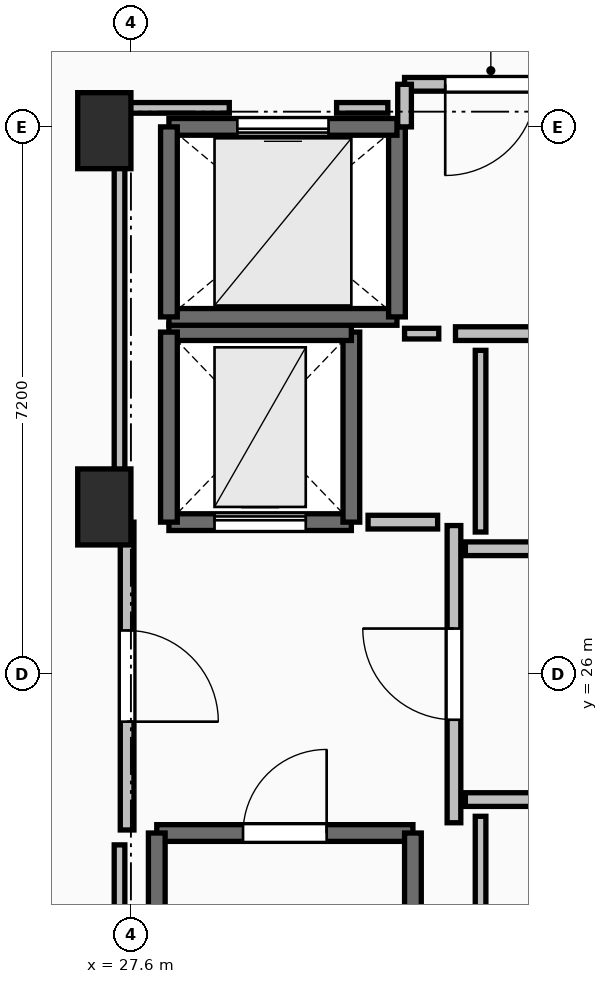
"""IFC4 building model, lengths in metres.
Left out: names, types, materials, properties, quantities, classifications, styles, units other than length and angle.
Written with IfcOpenShell. Run it as: python <this file> out.ifc"""

import sys

from ifc_helpers import new_model, si_unit, direction, frame, frame_2d, origin, origin_2d, place, context, subcontext, project, spatial, rectangle, extrude, element, fill, save


model = new_model("IFC4")
c1 = context("Model", 3, precision=1e-05, world=origin(), true_north=direction((0.0, 1.0)))
c2 = subcontext(c1, "Body", "Model", "MODEL_VIEW")
j1 = project(units=[si_unit("LENGTHUNIT", "METRE"), si_unit("PLANEANGLEUNIT", "RADIAN")], contexts=[c1])
p1 = place(None, origin())
s1 = spatial("IfcSite", under=j1, at=p1, CompositionType="ELEMENT")
p2 = place(p1, origin())
s2 = spatial("IfcBuilding", under=s1, at=p2, CompositionType="ELEMENT")
p3 = place(p2, frame((0.0, 0.0, 229.75)))
s3 = spatial("IfcBuildingStorey", under=s2, at=p3, CompositionType="ELEMENT", Elevation=229.75)
for number, where, z_axis, x_axis in (
    (1, (27.25, 28.2, 0.0), (0.0, 0.0, 1.0), (1.0, 0.0, 0.0)),
    (2, (27.25, 33.15, 0.0), (0.0, 0.0, 1.0), (1.0, 0.0, 0.0)),
):
    element("IfcColumn", number, at=place(p3, frame(where, z_axis=z_axis, x_axis=x_axis)), inside=s3, PredefinedType="PILASTER", context=c2, shape_type="SweptSolid", body=[
        extrude(rectangle(XDim=0.7, YDim=1.0, at=origin_2d()), origin(), (0.0, 0.0, 1.0), 4.5),
    ])
p4 = place(p3, frame((27.94, 23.91, 0.0), z_axis=(0.0, 0.0, 1.0), x_axis=(1.0, 0.0, 0.0)))
e3 = element("IfcWall", 3, at=p4, inside=s3, PredefinedType="SOLIDWALL", context=c2, shape_type="SweptSolid", body=[
    extrude(rectangle(XDim=3.37, YDim=0.22, at=frame_2d((1.685, 0.0))), origin(), (0.0, 0.0, 1.0), 4.24),
])
p5 = place(p4, frame((1.135, 0.0, 0.0)))
e4 = element("IfcOpeningElement", 4, at=p5, cuts=e3, PredefinedType="OPENING", context=c2, shape_type="SweptSolid", body=[
    extrude(rectangle(XDim=1.1, YDim=2.15, at=frame_2d((0.55, 1.075))), frame((0.0, 0.125, 0.0), z_axis=(0.0, -1.0, 0.0), x_axis=(1.0, 0.0, 0.0)), (0.0, 0.0, 1.0), 0.25),
])
for number, where, z_axis, x_axis in (
    (5, (31.31, 23.91, 0.0), (0.0, 0.0, 1.0), (0.0, -1.0, 0.0)),
    (6, (27.94, 16.49, 0.0), (0.0, 0.0, 1.0), (0.0, 1.0, 0.0)),
):
    element("IfcWall", number, at=place(p3, frame(where, z_axis=z_axis, x_axis=x_axis)), inside=s3, PredefinedType="SOLIDWALL", context=c2, shape_type="SweptSolid", body=[
        extrude(rectangle(XDim=7.42, YDim=0.22, at=frame_2d((3.71, 0.0))), origin(), (0.0, 0.0, 1.0), 4.24),
    ])
p6 = place(p3, frame((28.1, 28.0, 0.0), z_axis=(0.0, 0.0, 1.0), x_axis=(1.0, 0.0, 0.0)))
e7 = element("IfcWall", 7, at=p6, inside=s3, PredefinedType="SHEAR", context=c2, shape_type="SweptSolid", body=[
    extrude(rectangle(XDim=2.4, YDim=0.22, at=frame_2d((1.2, 0.0))), origin(), (0.0, 0.0, 1.0), 4.24),
])
p7 = place(p6, frame((0.6, 0.0, 0.0)))
e8 = element("IfcOpeningElement", 8, at=p7, cuts=e7, PredefinedType="OPENING", context=c2, shape_type="SweptSolid", body=[
    extrude(rectangle(XDim=1.2, YDim=2.2, at=frame_2d((0.6, 1.1))), frame((0.0, 0.125, 0.0), z_axis=(0.0, -1.0, 0.0), x_axis=(1.0, 0.0, 0.0)), (0.0, 0.0, 1.0), 0.25),
])
p8 = place(p3, frame((30.5, 28.0, 0.0), z_axis=(0.0, 0.0, 1.0), x_axis=(0.0, 1.0, 0.0)))
e9 = element("IfcWall", 9, at=p8, inside=s3, PredefinedType="SHEAR", context=c2, shape_type="SweptSolid", body=[
    extrude(rectangle(XDim=2.5, YDim=0.22, at=frame_2d((1.25, 0.0))), origin(), (0.0, 0.0, 1.0), 4.24),
])
p9 = place(p3, frame((30.5, 30.5, 0.0), z_axis=(0.0, 0.0, 1.0), x_axis=(-1.0, 0.0, 0.0)))
e10 = element("IfcWall", 10, at=p9, inside=s3, PredefinedType="SHEAR", context=c2, shape_type="SweptSolid", body=[
    extrude(rectangle(XDim=2.4, YDim=0.22, at=frame_2d((1.2, 0.0))), origin(), (0.0, 0.0, 1.0), 4.24),
])
p10 = place(p3, frame((28.1, 30.5, 0.0), z_axis=(0.0, 0.0, 1.0), x_axis=(0.0, -1.0, 0.0)))
e11 = element("IfcWall", 11, at=p10, inside=s3, PredefinedType="SHEAR", context=c2, shape_type="SweptSolid", body=[
    extrude(rectangle(XDim=2.5, YDim=0.22, at=frame_2d((1.25, 0.0))), origin(), (0.0, 0.0, 1.0), 4.24),
])
p11 = place(p3, frame((28.1, 30.7, 0.0), z_axis=(0.0, 0.0, 1.0), x_axis=(1.0, 0.0, 0.0)))
e12 = element("IfcWall", 12, at=p11, inside=s3, PredefinedType="SOLIDWALL", context=c2, shape_type="SweptSolid", body=[
    extrude(rectangle(XDim=3.0, YDim=0.22, at=frame_2d((1.5, 0.0))), origin(), (0.0, 0.0, 1.0), 4.24),
])
p12 = place(p3, frame((31.1, 30.7, 0.0), z_axis=(0.0, 0.0, 1.0), x_axis=(0.0, 1.0, 0.0)))
e13 = element("IfcWall", 13, at=p12, inside=s3, PredefinedType="SOLIDWALL", context=c2, shape_type="SweptSolid", body=[
    extrude(rectangle(XDim=2.5, YDim=0.22, at=frame_2d((1.25, 0.0))), origin(), (0.0, 0.0, 1.0), 4.24),
])
p13 = place(p3, frame((31.1, 33.2, 0.0), z_axis=(0.0, 0.0, 1.0), x_axis=(-1.0, 0.0, 0.0)))
e14 = element("IfcWall", 14, at=p13, inside=s3, PredefinedType="SOLIDWALL", context=c2, shape_type="SweptSolid", body=[
    extrude(rectangle(XDim=3.0, YDim=0.22, at=frame_2d((1.5, 0.0))), origin(), (0.0, 0.0, 1.0), 4.24),
])
p14 = place(p13, frame((0.9, 0.0, 0.0)))
e15 = element("IfcOpeningElement", 15, at=p14, cuts=e14, PredefinedType="OPENING", context=c2, shape_type="SweptSolid", body=[
    extrude(rectangle(XDim=1.2, YDim=2.2, at=frame_2d((0.6, 1.1))), frame((0.0, 0.125, 0.0), z_axis=(0.0, -1.0, 0.0), x_axis=(1.0, 0.0, 0.0)), (0.0, 0.0, 1.0), 0.25),
])
p15 = place(p3, frame((28.1, 33.2, 0.0), z_axis=(0.0, 0.0, 1.0), x_axis=(0.0, -1.0, 0.0)))
e16 = element("IfcWall", 16, at=p15, inside=s3, PredefinedType="SOLIDWALL", context=c2, shape_type="SweptSolid", body=[
    extrude(rectangle(XDim=2.5, YDim=0.22, at=frame_2d((1.25, 0.0))), origin(), (0.0, 0.0, 1.0), 4.24),
])
p16 = place(p3, frame((31.85, 24.045, 0.0), z_axis=(0.0, 0.0, 1.0), x_axis=(0.0, 1.0, 0.0)))
e17 = element("IfcWall", 17, at=p16, inside=s3, PredefinedType="PARTITIONING", context=c2, shape_type="SweptSolid", body=[
    extrude(rectangle(XDim=3.91, YDim=0.18, at=frame_2d((1.955, 0.0))), origin(), (0.0, 0.0, 1.0), 4.24),
])
p17 = place(p16, frame((1.355, 0.0, 0.0)))
e18 = element("IfcOpeningElement", 18, at=p17, cuts=e17, PredefinedType="OPENING", context=c2, shape_type="SweptSolid", body=[
    extrude(rectangle(XDim=1.2, YDim=2.15, at=frame_2d((0.6, 1.075))), frame((0.0, 0.105, 0.0), z_axis=(0.0, -1.0, 0.0), x_axis=(1.0, 0.0, 0.0)), (0.0, 0.0, 1.0), 0.21),
])
p18 = place(p3, frame((27.55, 28.0, 0.0), z_axis=(0.0, 0.0, 1.0), x_axis=(0.0, -1.0, 0.0)))
e19 = element("IfcWall", 19, at=p18, inside=s3, PredefinedType="PARTITIONING", context=c2, shape_type="SweptSolid", body=[
    extrude(rectangle(XDim=4.05, YDim=0.18, at=frame_2d((2.025, 0.0))), origin(), (0.0, 0.0, 1.0), 4.24),
])
p19 = place(p18, frame((1.425, 0.0, 0.0)))
e20 = element("IfcOpeningElement", 20, at=p19, cuts=e19, PredefinedType="OPENING", context=c2, shape_type="SweptSolid", body=[
    extrude(rectangle(XDim=1.2, YDim=2.15, at=frame_2d((0.6, 1.075))), frame((0.0, 0.105, 0.0), z_axis=(0.0, -1.0, 0.0), x_axis=(1.0, 0.0, 0.0)), (0.0, 0.0, 1.0), 0.21),
])
p20 = place(p3, frame((31.87, 30.48, 0.0), z_axis=(0.0, 0.0, 1.0), x_axis=(1.0, 0.0, 0.0)))
e21 = element("IfcWall", 21, at=p20, inside=s3, PredefinedType="PARTITIONING", context=c2, shape_type="SweptSolid", body=[
    extrude(rectangle(XDim=1.6, YDim=0.18, at=frame_2d((0.8, 0.0))), origin(), (0.0, 0.0, 1.0), 4.24),
])
p21 = place(p3, frame((33.47, 33.76, 0.0), z_axis=(0.0, 0.0, 1.0), x_axis=(-1.0, 0.0, 0.0)))
e22 = element("IfcWall", 22, at=p21, inside=s3, PredefinedType="PARTITIONING", context=c2, shape_type="SweptSolid", body=[
    extrude(rectangle(XDim=2.27, YDim=0.18, at=frame_2d((1.135, 0.0))), origin(), (0.0, 0.0, 1.0), 4.24),
])
p22 = place(p21, frame((0.535, 0.0, 0.0)))
e23 = element("IfcOpeningElement", 23, at=p22, cuts=e22, PredefinedType="OPENING", context=c2, shape_type="SweptSolid", body=[
    extrude(rectangle(XDim=1.2, YDim=2.15, at=frame_2d((0.6, 1.075))), frame((0.0, 0.105, 0.0), z_axis=(0.0, -1.0, 0.0), x_axis=(1.0, 0.0, 0.0)), (0.0, 0.0, 1.0), 0.21),
])
p23 = place(p3, frame((31.2, 33.76, 0.0), z_axis=(0.0, 0.0, 1.0), x_axis=(0.0, -1.0, 0.0)))
e24 = element("IfcWall", 24, at=p23, inside=s3, PredefinedType="PARTITIONING", context=c2, shape_type="SweptSolid", body=[
    extrude(rectangle(XDim=0.56, YDim=0.18, at=frame_2d((0.28, 0.0))), origin(), (0.0, 0.0, 1.0), 4.24),
])
p24 = place(p3, frame((35.04, 27.65, 0.0), z_axis=(0.0, 0.0, 1.0), x_axis=(-1.0, 0.0, 0.0)))
e25 = element("IfcWall", 25, at=p24, inside=s3, PredefinedType="PARTITIONING", context=c2, shape_type="SweptSolid", body=[
    extrude(rectangle(XDim=3.04, YDim=0.18, at=frame_2d((1.52, 0.0))), origin(), (0.0, 0.0, 1.0), 4.24),
])
p25 = place(p24, frame((1.02, 0.0, 0.0)))
e26 = element("IfcOpeningElement", 26, at=p25, cuts=e25, PredefinedType="OPENING", context=c2, shape_type="SweptSolid", body=[
    extrude(rectangle(XDim=1.0, YDim=2.15, at=frame_2d((0.5, 1.075))), frame((0.0, 0.105, 0.0), z_axis=(0.0, -1.0, 0.0), x_axis=(1.0, 0.0, 0.0)), (0.0, 0.0, 1.0), 0.21),
])
p26 = place(p3, frame((32.0, 24.35, 0.0), z_axis=(0.0, 0.0, 1.0), x_axis=(1.0, 0.0, 0.0)))
e27 = element("IfcWall", 27, at=p26, inside=s3, PredefinedType="PARTITIONING", context=c2, shape_type="SweptSolid", body=[
    extrude(rectangle(XDim=6.645, YDim=0.18, at=frame_2d((3.323, 0.0))), origin(), (0.0, 0.0, 1.0), 4.24),
])
p27 = place(p26, frame((2.897, 0.0, 0.0)))
e28 = element("IfcOpeningElement", 28, at=p27, cuts=e27, PredefinedType="OPENING", context=c2, shape_type="SweptSolid", body=[
    extrude(rectangle(XDim=0.85, YDim=2.1, at=frame_2d((0.425, 1.05))), frame((0.0, 0.105, 0.0), z_axis=(0.0, -1.0, 0.0), x_axis=(1.0, 0.0, 0.0)), (0.0, 0.0, 1.0), 0.21),
])
p28 = place(p3, frame((31.635, 28.0, 0.0), z_axis=(0.0, 0.0, 1.0), x_axis=(-1.0, 0.0, 0.0)))
e29 = element("IfcWall", 29, at=p28, inside=s3, PredefinedType="PARTITIONING", context=c2, shape_type="SweptSolid", body=[
    extrude(rectangle(XDim=0.915, YDim=0.18, at=frame_2d((0.458, 0.0))), origin(), (0.0, 0.0, 1.0), 4.24),
])
p29 = place(p3, frame((31.2, 30.48, 0.0), z_axis=(0.0, 0.0, 1.0), x_axis=(1.0, 0.0, 0.0)))
e30 = element("IfcWall", 30, at=p29, inside=s3, PredefinedType="PARTITIONING", context=c2, shape_type="SweptSolid", body=[
    extrude(rectangle(XDim=0.45, YDim=0.14, at=frame_2d((0.225, 0.0))), origin(), (0.0, 0.0, 1.0), 4.24),
])
p30 = place(p3, frame((32.2, 30.26, 0.0), z_axis=(0.0, 0.0, 1.0), x_axis=(0.0, -1.0, 0.0)))
e31 = element("IfcWall", 31, at=p30, inside=s3, PredefinedType="PARTITIONING", context=c2, shape_type="SweptSolid", body=[
    extrude(rectangle(XDim=2.39, YDim=0.14, at=frame_2d((1.195, 0.0))), origin(), (0.0, 0.0, 1.0), 4.24),
])
p31 = place(p3, frame((32.2, 24.13, 0.0), z_axis=(0.0, 0.0, 1.0), x_axis=(0.0, -1.0, 0.0)))
e32 = element("IfcWall", 32, at=p31, inside=s3, PredefinedType="PARTITIONING", context=c2, shape_type="SweptSolid", body=[
    extrude(rectangle(XDim=2.46, YDim=0.14, at=frame_2d((1.23, 0.0))), origin(), (0.0, 0.0, 1.0), 3.432),
])
p32 = place(p3, frame((30.98, 33.45, 0.0), z_axis=(0.0, 0.0, 1.0), x_axis=(-1.0, 0.0, 0.0)))
e33 = element("IfcWall", 33, at=p32, inside=s3, PredefinedType="PARTITIONING", context=c2, shape_type="SweptSolid", body=[
    extrude(rectangle(XDim=0.674, YDim=0.14, at=frame_2d((0.337, 0.0))), origin(), (0.0, 0.0, 1.0), 4.24),
])
p33 = place(p3, frame((28.894, 33.45, 0.0), z_axis=(0.0, 0.0, 1.0), x_axis=(-1.0, 0.0, 0.0)))
e34 = element("IfcWall", 34, at=p33, inside=s3, PredefinedType="PARTITIONING", context=c2, shape_type="SweptSolid", body=[
    extrude(rectangle(XDim=1.444, YDim=0.14, at=frame_2d((0.722, 0.0))), origin(), (0.0, 0.0, 1.0), 3.432),
])
p34 = place(p3, frame((27.45, 33.45, 0.0), z_axis=(0.0, 0.0, 1.0), x_axis=(0.0, -1.0, 0.0)))
e35 = element("IfcWall", 35, at=p34, inside=s3, PredefinedType="PARTITIONING", context=c2, shape_type="SweptSolid", body=[
    extrude(rectangle(XDim=5.254, YDim=0.14, at=frame_2d((2.627, 0.0))), origin(), (0.0, 0.0, 1.0), 3.432),
])
p35 = place(p3, frame((27.45, 23.754, 0.0), z_axis=(0.0, 0.0, 1.0), x_axis=(0.0, -1.0, 0.0)))
e36 = element("IfcWall", 36, at=p35, inside=s3, PredefinedType="PARTITIONING", context=c2, shape_type="SweptSolid", body=[
    extrude(rectangle(XDim=7.514, YDim=0.14, at=frame_2d((3.757, 0.0))), origin(), (0.0, 0.0, 1.0), 3.432),
])
p36 = place(p5, origin())
e37 = element("IfcDoor", 37, at=p36, inside=s3, OperationType="SINGLE_SWING_RIGHT", PredefinedType="DOOR", context=c2, shape_type="SweptSolid", body=[
    extrude(rectangle(XDim=1.1, YDim=2.15, at=frame_2d((0.55, 1.075))), frame((0.0, 0.025, 0.0), z_axis=(0.0, -1.0, 0.0), x_axis=(1.0, 0.0, 0.0)), (0.0, 0.0, 1.0), 0.05),
])
fill(e4, e37)
p37 = place(p7, origin())
e38 = element("IfcDoor", 38, at=p37, inside=s3, OperationType="SLIDING_TO_LEFT", PredefinedType="DOOR", context=c2, shape_type="SweptSolid", body=[
    extrude(rectangle(XDim=1.2, YDim=2.2, at=frame_2d((0.6, 1.1))), frame((0.0, 0.025, 0.0), z_axis=(0.0, -1.0, 0.0), x_axis=(1.0, 0.0, 0.0)), (0.0, 0.0, 1.0), 0.05),
])
fill(e8, e38)
p38 = place(p14, origin())
e39 = element("IfcDoor", 39, at=p38, inside=s3, OperationType="SLIDING_TO_LEFT", PredefinedType="DOOR", context=c2, shape_type="SweptSolid", body=[
    extrude(rectangle(XDim=1.2, YDim=2.2, at=frame_2d((0.6, 1.1))), frame((0.0, 0.025, 0.0), z_axis=(0.0, -1.0, 0.0), x_axis=(1.0, 0.0, 0.0)), (0.0, 0.0, 1.0), 0.05),
])
fill(e15, e39)
p39 = place(p17, origin())
e40 = element("IfcDoor", 40, at=p39, inside=s3, OperationType="SINGLE_SWING_RIGHT", PredefinedType="DOOR", context=c2, shape_type="SweptSolid", body=[
    extrude(rectangle(XDim=1.2, YDim=2.15, at=frame_2d((0.6, 1.075))), frame((0.0, 0.025, 0.0), z_axis=(0.0, -1.0, 0.0), x_axis=(1.0, 0.0, 0.0)), (0.0, 0.0, 1.0), 0.05),
])
fill(e18, e40)
p40 = place(p19, origin())
e41 = element("IfcDoor", 41, at=p40, inside=s3, OperationType="SINGLE_SWING_RIGHT", PredefinedType="DOOR", context=c2, shape_type="SweptSolid", body=[
    extrude(rectangle(XDim=1.2, YDim=2.15, at=frame_2d((0.6, 1.075))), frame((0.0, 0.025, 0.0), z_axis=(0.0, -1.0, 0.0), x_axis=(1.0, 0.0, 0.0)), (0.0, 0.0, 1.0), 0.05),
])
fill(e20, e41)
p41 = place(p22, origin())
e42 = element("IfcDoor", 42, at=p41, inside=s3, OperationType="SINGLE_SWING_RIGHT", PredefinedType="DOOR", context=c2, shape_type="SweptSolid", body=[
    extrude(rectangle(XDim=1.2, YDim=2.15, at=frame_2d((0.6, 1.075))), frame((0.0, 0.025, 0.0), z_axis=(0.0, -1.0, 0.0), x_axis=(1.0, 0.0, 0.0)), (0.0, 0.0, 1.0), 0.05),
])
fill(e23, e42)
save(model, sys.argv[1])
